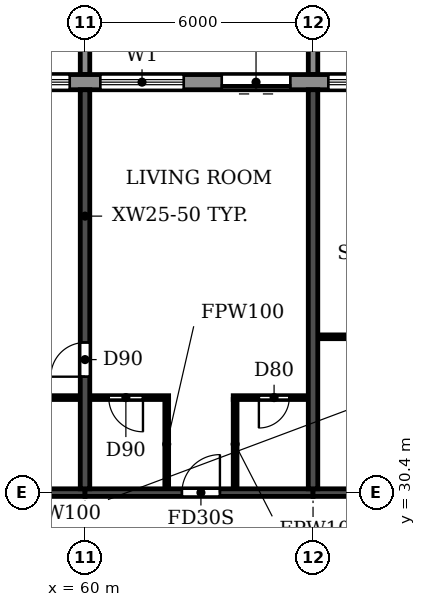
"""IFC4 building model, lengths in metres.
Left out: names, types, materials, properties, quantities, classifications, styles, units other than length and angle.
Written with IfcOpenShell. Run it as: python <this file> out.ifc"""

import sys

from ifc_helpers import new_model, si_unit, direction, frame, frame_2d, origin, place, context, subcontext, project, spatial, polyline, rectangle, outline, extrude, source, transform, mapped, element, fill, save


model = new_model("IFC4")
c1 = context("Model", 3, precision=1e-05, world=origin(), true_north=direction((0.0, 1.0)))
c2 = subcontext(c1, "Body", "Model", "MODEL_VIEW")
j1 = project(units=[si_unit("LENGTHUNIT", "METRE"), si_unit("PLANEANGLEUNIT", "RADIAN")], contexts=[c1])
p1 = place(None, origin())
s1 = spatial("IfcSite", under=j1, at=p1, CompositionType="ELEMENT")
p2 = place(p1, origin())
s2 = spatial("IfcBuilding", under=s1, at=p2, CompositionType="ELEMENT")
p3 = place(p2, frame((0.0, 0.0, 241.2)))
s3 = spatial("IfcBuildingStorey", under=s2, at=p3, CompositionType="ELEMENT", Elevation=241.2)
p4 = place(p3, frame((60.0, 30.5, 0.0), z_axis=(0.0, 0.0, 1.0), x_axis=(0.0, 1.0, 0.0)))
e1 = element("IfcWall", 1, at=p4, inside=s3, PredefinedType="SHEAR", context=c2, shape_type="SweptSolid", body=[
    extrude(rectangle(XDim=10.5, YDim=0.25, at=frame_2d((5.25, 0.0))), origin(), (0.0, 0.0, 1.0), 3.08),
])
p5 = place(p4, frame((2.95, 0.0, 0.0)))
e2 = element("IfcOpeningElement", 2, at=p5, cuts=e1, PredefinedType="OPENING", context=c2, shape_type="SweptSolid", body=[
    extrude(rectangle(XDim=0.9, YDim=2.1, at=frame_2d((0.45, 1.05))), frame((0.0, 0.135, 0.0), z_axis=(0.0, -1.0, 0.0), x_axis=(1.0, 0.0, 0.0)), (0.0, 0.0, 1.0), 0.27),
])
p6 = place(p3, frame((66.0, 30.5, 0.0), z_axis=(0.0, 0.0, 1.0), x_axis=(0.0, 1.0, 0.0)))
e3 = element("IfcWall", 3, at=p6, inside=s3, PredefinedType="SHEAR", context=c2, shape_type="SweptSolid", body=[
    extrude(rectangle(XDim=10.5, YDim=0.25, at=frame_2d((5.25, 0.0))), origin(), (0.0, 0.0, 1.0), 3.08),
])
p7 = place(p3, frame((54.0, 30.4, 0.0), z_axis=(0.0, 0.0, 1.0), x_axis=(1.0, 0.0, 0.0)))
e4 = element("IfcWall", 4, at=p7, inside=s3, PredefinedType="SHEAR", context=c2, shape_type="SweptSolid", body=[
    extrude(rectangle(XDim=6.0, YDim=0.2, at=frame_2d((3.0, 0.0))), origin(), (0.0, 0.0, 1.0), 2.48),
])
p8 = place(p3, frame((60.0, 30.4, 0.0), z_axis=(0.0, 0.0, 1.0), x_axis=(1.0, 0.0, 0.0)))
e5 = element("IfcWall", 5, at=p8, inside=s3, PredefinedType="SHEAR", context=c2, shape_type="SweptSolid", body=[
    extrude(rectangle(XDim=6.0, YDim=0.2, at=frame_2d((3.0, 0.0))), origin(), (0.0, 0.0, 1.0), 2.48),
])
p9 = place(p8, frame((2.55, 0.0, 0.0)))
e6 = element("IfcOpeningElement", 6, at=p9, cuts=e5, PredefinedType="OPENING", context=c2, shape_type="SweptSolid", body=[
    extrude(rectangle(XDim=1.0, YDim=2.1, at=frame_2d((0.5, 1.05))), frame((0.0, 0.11, 0.0), z_axis=(0.0, -1.0, 0.0), x_axis=(1.0, 0.0, 0.0)), (0.0, 0.0, 1.0), 0.22),
])
p10 = place(p3, frame((66.0, 30.4, 0.0), z_axis=(0.0, 0.0, 1.0), x_axis=(1.0, 0.0, 0.0)))
e7 = element("IfcWall", 7, at=p10, inside=s3, PredefinedType="SHEAR", context=c2, shape_type="SweptSolid", body=[
    extrude(rectangle(XDim=6.0, YDim=0.2, at=frame_2d((3.0, 0.0))), origin(), (0.0, 0.0, 1.0), 2.48),
])
p11 = place(p10, frame((2.45, 0.0, 0.0)))
e8 = element("IfcOpeningElement", 8, at=p11, cuts=e7, PredefinedType="OPENING", context=c2, shape_type="SweptSolid", body=[
    extrude(rectangle(XDim=1.0, YDim=2.1, at=frame_2d((0.5, 1.05))), frame((0.0, 0.11, 0.0), z_axis=(0.0, -1.0, 0.0), x_axis=(1.0, 0.0, 0.0)), (0.0, 0.0, 1.0), 0.22),
])
p12 = place(p3, frame((79.317, 41.2, 0.0), z_axis=(0.0, 0.0, 1.0), x_axis=(-1.0, 0.0, 0.0)))
e9 = element("IfcWall", 9, at=p12, inside=s3, PredefinedType="STANDARD", context=c2, shape_type="SweptSolid", body=[
    extrude(rectangle(XDim=56.634, YDim=0.4, at=frame_2d((28.317, 0.0))), origin(), (0.0, 0.0, 1.0), 3.08),
])
p13 = place(p12, frame((52.917, 0.0, 0.0)))
e10 = element("IfcOpeningElement", 10, at=p13, cuts=e9, PredefinedType="OPENING", context=c2, shape_type="SweptSolid", body=[
    extrude(rectangle(XDim=1.8, YDim=2.4, at=frame_2d((0.9, 1.2))), frame((0.0, 0.21, 0.0), z_axis=(0.0, -1.0, 0.0), x_axis=(1.0, 0.0, 0.0)), (0.0, 0.0, 1.0), 0.42),
])
p14 = place(p12, frame((49.717, 0.0, 0.9)))
e11 = element("IfcOpeningElement", 11, at=p14, cuts=e9, PredefinedType="OPENING", context=c2, shape_type="SweptSolid", body=[
    extrude(rectangle(XDim=2.2, YDim=1.5, at=frame_2d((1.1, 0.75))), frame((0.0, 0.21, 0.0), z_axis=(0.0, -1.0, 0.0), x_axis=(1.0, 0.0, 0.0)), (0.0, 0.0, 1.0), 0.42),
])
p15 = place(p12, frame((46.717, 0.0, 0.9)))
e12 = element("IfcOpeningElement", 12, at=p15, cuts=e9, PredefinedType="OPENING", context=c2, shape_type="SweptSolid", body=[
    extrude(rectangle(XDim=2.2, YDim=1.5, at=frame_2d((1.1, 0.75))), frame((0.0, 0.21, 0.0), z_axis=(0.0, -1.0, 0.0), x_axis=(1.0, 0.0, 0.0)), (0.0, 0.0, 1.0), 0.42),
])
p16 = place(p12, frame((43.717, 0.0, 0.9)))
e13 = element("IfcOpeningElement", 13, at=p16, cuts=e9, PredefinedType="OPENING", context=c2, shape_type="SweptSolid", body=[
    extrude(rectangle(XDim=2.2, YDim=1.5, at=frame_2d((1.1, 0.75))), frame((0.0, 0.21, 0.0), z_axis=(0.0, -1.0, 0.0), x_axis=(1.0, 0.0, 0.0)), (0.0, 0.0, 1.0), 0.42),
])
p17 = place(p12, frame((40.917, 0.0, 0.0)))
e14 = element("IfcOpeningElement", 14, at=p17, cuts=e9, PredefinedType="OPENING", context=c2, shape_type="SweptSolid", body=[
    extrude(rectangle(XDim=1.8, YDim=2.4, at=frame_2d((0.9, 1.2))), frame((0.0, 0.21, 0.0), z_axis=(0.0, -1.0, 0.0), x_axis=(1.0, 0.0, 0.0)), (0.0, 0.0, 1.0), 0.42),
])
p18 = place(p12, frame((37.717, 0.0, 0.9)))
e15 = element("IfcOpeningElement", 15, at=p18, cuts=e9, PredefinedType="OPENING", context=c2, shape_type="SweptSolid", body=[
    extrude(rectangle(XDim=2.2, YDim=1.5, at=frame_2d((1.1, 0.75))), frame((0.0, 0.21, 0.0), z_axis=(0.0, -1.0, 0.0), x_axis=(1.0, 0.0, 0.0)), (0.0, 0.0, 1.0), 0.42),
])
p19 = place(p12, frame((34.717, 0.0, 0.9)))
e16 = element("IfcOpeningElement", 16, at=p19, cuts=e9, PredefinedType="OPENING", context=c2, shape_type="SweptSolid", body=[
    extrude(rectangle(XDim=2.2, YDim=1.5, at=frame_2d((1.1, 0.75))), frame((0.0, 0.21, 0.0), z_axis=(0.0, -1.0, 0.0), x_axis=(1.0, 0.0, 0.0)), (0.0, 0.0, 1.0), 0.42),
])
p20 = place(p12, frame((31.717, 0.0, 0.9)))
e17 = element("IfcOpeningElement", 17, at=p20, cuts=e9, PredefinedType="OPENING", context=c2, shape_type="SweptSolid", body=[
    extrude(rectangle(XDim=2.2, YDim=1.5, at=frame_2d((1.1, 0.75))), frame((0.0, 0.21, 0.0), z_axis=(0.0, -1.0, 0.0), x_axis=(1.0, 0.0, 0.0)), (0.0, 0.0, 1.0), 0.42),
])
p21 = place(p12, frame((28.717, 0.0, 0.9)))
e18 = element("IfcOpeningElement", 18, at=p21, cuts=e9, PredefinedType="OPENING", context=c2, shape_type="SweptSolid", body=[
    extrude(rectangle(XDim=2.2, YDim=1.5, at=frame_2d((1.1, 0.75))), frame((0.0, 0.21, 0.0), z_axis=(0.0, -1.0, 0.0), x_axis=(1.0, 0.0, 0.0)), (0.0, 0.0, 1.0), 0.42),
])
p22 = place(p12, frame((25.917, 0.0, 0.0)))
e19 = element("IfcOpeningElement", 19, at=p22, cuts=e9, PredefinedType="OPENING", context=c2, shape_type="SweptSolid", body=[
    extrude(rectangle(XDim=1.8, YDim=2.4, at=frame_2d((0.9, 1.2))), frame((0.0, 0.21, 0.0), z_axis=(0.0, -1.0, 0.0), x_axis=(1.0, 0.0, 0.0)), (0.0, 0.0, 1.0), 0.42),
])
p23 = place(p12, frame((22.717, 0.0, 0.9)))
e20 = element("IfcOpeningElement", 20, at=p23, cuts=e9, PredefinedType="OPENING", context=c2, shape_type="SweptSolid", body=[
    extrude(rectangle(XDim=2.2, YDim=1.5, at=frame_2d((1.1, 0.75))), frame((0.0, 0.21, 0.0), z_axis=(0.0, -1.0, 0.0), x_axis=(1.0, 0.0, 0.0)), (0.0, 0.0, 1.0), 0.42),
])
p24 = place(p12, frame((19.717, 0.0, 0.9)))
e21 = element("IfcOpeningElement", 21, at=p24, cuts=e9, PredefinedType="OPENING", context=c2, shape_type="SweptSolid", body=[
    extrude(rectangle(XDim=2.2, YDim=1.5, at=frame_2d((1.1, 0.75))), frame((0.0, 0.21, 0.0), z_axis=(0.0, -1.0, 0.0), x_axis=(1.0, 0.0, 0.0)), (0.0, 0.0, 1.0), 0.42),
])
p25 = place(p12, frame((16.717, 0.0, 0.9)))
e22 = element("IfcOpeningElement", 22, at=p25, cuts=e9, PredefinedType="OPENING", context=c2, shape_type="SweptSolid", body=[
    extrude(rectangle(XDim=2.2, YDim=1.5, at=frame_2d((1.1, 0.75))), frame((0.0, 0.21, 0.0), z_axis=(0.0, -1.0, 0.0), x_axis=(1.0, 0.0, 0.0)), (0.0, 0.0, 1.0), 0.42),
])
p26 = place(p12, frame((13.917, 0.0, 0.0)))
e23 = element("IfcOpeningElement", 23, at=p26, cuts=e9, PredefinedType="OPENING", context=c2, shape_type="SweptSolid", body=[
    extrude(rectangle(XDim=1.8, YDim=2.4, at=frame_2d((0.9, 1.2))), frame((0.0, 0.21, 0.0), z_axis=(0.0, -1.0, 0.0), x_axis=(1.0, 0.0, 0.0)), (0.0, 0.0, 1.0), 0.42),
])
p27 = place(p12, frame((10.717, 0.0, 0.9)))
e24 = element("IfcOpeningElement", 24, at=p27, cuts=e9, PredefinedType="OPENING", context=c2, shape_type="SweptSolid", body=[
    extrude(rectangle(XDim=2.2, YDim=1.5, at=frame_2d((1.1, 0.75))), frame((0.0, 0.21, 0.0), z_axis=(0.0, -1.0, 0.0), x_axis=(1.0, 0.0, 0.0)), (0.0, 0.0, 1.0), 0.42),
])
p28 = place(p12, frame((7.917, 0.0, 0.0)))
e25 = element("IfcOpeningElement", 25, at=p28, cuts=e9, PredefinedType="OPENING", context=c2, shape_type="SweptSolid", body=[
    extrude(rectangle(XDim=1.8, YDim=2.4, at=frame_2d((0.9, 1.2))), frame((0.0, 0.21, 0.0), z_axis=(0.0, -1.0, 0.0), x_axis=(1.0, 0.0, 0.0)), (0.0, 0.0, 1.0), 0.42),
])
p29 = place(p12, frame((4.717, 0.0, 0.9)))
e26 = element("IfcOpeningElement", 26, at=p29, cuts=e9, PredefinedType="OPENING", context=c2, shape_type="SweptSolid", body=[
    extrude(rectangle(XDim=2.2, YDim=1.5, at=frame_2d((1.1, 0.75))), frame((0.0, 0.21, 0.0), z_axis=(0.0, -1.0, 0.0), x_axis=(1.0, 0.0, 0.0)), (0.0, 0.0, 1.0), 0.42),
])
p30 = place(p12, frame((1.917, 0.0, 0.0)))
e27 = element("IfcOpeningElement", 27, at=p30, cuts=e9, PredefinedType="OPENING", context=c2, shape_type="SweptSolid", body=[
    extrude(rectangle(XDim=1.8, YDim=2.4, at=frame_2d((0.9, 1.2))), frame((0.0, 0.21, 0.0), z_axis=(0.0, -1.0, 0.0), x_axis=(1.0, 0.0, 0.0)), (0.0, 0.0, 1.0), 0.42),
])
m1 = source(origin(), c2, "Body", "SweptSolid", [
    extrude(outline(polyline([(0.0, 0.0), (0.25, 0.0), (0.25, 3.1), (0.0, 3.1), (0.0, 0.0)])), origin(), (0.0, 0.0, 1.0), 3.1),
])
for number, where in (
    (28, (59.875, 41.4, 0.0)),
    (29, (65.875, 41.4, 0.0)),
):
    element("IfcWall", number, at=place(p3, frame(where)), inside=s3, PredefinedType="STANDARD", context=c2, shape_type="MappedRepresentation", body=[
        mapped(m1, transform((0.0, 0.0, 0.0))),
    ])
p31 = place(p3, frame((57.1, 32.9, 0.0), z_axis=(0.0, 0.0, 1.0), x_axis=(1.0, 0.0, 0.0)))
e30 = element("IfcWall", 30, at=p31, inside=s3, PredefinedType="PARTITIONING", context=c2, shape_type="SweptSolid", body=[
    extrude(rectangle(XDim=2.765, YDim=0.1, at=frame_2d((1.382, 0.0))), origin(), (0.0, 0.0, 1.0), 3.08),
])
p32 = place(p31, frame((1.0, 0.0, 0.0)))
e31 = element("IfcOpeningElement", 31, at=p32, cuts=e30, PredefinedType="OPENING", context=c2, shape_type="SweptSolid", body=[
    extrude(rectangle(XDim=0.8, YDim=2.1, at=frame_2d((0.4, 1.05))), frame((0.0, 0.06, 0.0), z_axis=(0.0, -1.0, 0.0), x_axis=(1.0, 0.0, 0.0)), (0.0, 0.0, 1.0), 0.12),
])
p33 = place(p3, frame((60.135, 32.9, 0.0), z_axis=(0.0, 0.0, 1.0), x_axis=(1.0, 0.0, 0.0)))
e32 = element("IfcWall", 32, at=p33, inside=s3, PredefinedType="PARTITIONING", context=c2, shape_type="SweptSolid", body=[
    extrude(rectangle(XDim=2.065, YDim=0.1, at=frame_2d((1.032, 0.0))), origin(), (0.0, 0.0, 1.0), 3.08),
])
p34 = place(p33, frame((0.49, 0.0, 0.0)))
e33 = element("IfcOpeningElement", 33, at=p34, cuts=e32, PredefinedType="OPENING", context=c2, shape_type="SweptSolid", body=[
    extrude(rectangle(XDim=0.9, YDim=2.1, at=frame_2d((0.45, 1.05))), frame((0.0, 0.06, 0.0), z_axis=(0.0, -1.0, 0.0), x_axis=(1.0, 0.0, 0.0)), (0.0, 0.0, 1.0), 0.12),
])
p35 = place(p3, frame((63.9, 32.9, 0.0), z_axis=(0.0, 0.0, 1.0), x_axis=(1.0, 0.0, 0.0)))
e34 = element("IfcWall", 34, at=p35, inside=s3, PredefinedType="PARTITIONING", context=c2, shape_type="SweptSolid", body=[
    extrude(rectangle(XDim=1.965, YDim=0.1, at=frame_2d((0.982, 0.0))), origin(), (0.0, 0.0, 1.0), 3.08),
])
p36 = place(p35, frame((0.675, 0.0, 0.0)))
e35 = element("IfcOpeningElement", 35, at=p36, cuts=e34, PredefinedType="OPENING", context=c2, shape_type="SweptSolid", body=[
    extrude(rectangle(XDim=0.8, YDim=2.1, at=frame_2d((0.4, 1.05))), frame((0.0, 0.06, 0.0), z_axis=(0.0, -1.0, 0.0), x_axis=(1.0, 0.0, 0.0)), (0.0, 0.0, 1.0), 0.12),
])
p37 = place(p3, frame((66.135, 34.5, 0.0), z_axis=(0.0, 0.0, 1.0), x_axis=(1.0, 0.0, 0.0)))
e36 = element("IfcWall", 36, at=p37, inside=s3, PredefinedType="PARTITIONING", context=c2, shape_type="SweptSolid", body=[
    extrude(rectangle(XDim=1.965, YDim=0.1, at=frame_2d((0.982, 0.0))), origin(), (0.0, 0.0, 1.0), 3.08),
])
for number, where, z_axis, x_axis in (
    (37, (62.15, 30.51, 0.0), (0.0, 0.0, 1.0), (0.0, 1.0, 0.0)),
    (38, (63.95, 30.51, 0.0), (0.0, 0.0, 1.0), (0.0, 1.0, 0.0)),
):
    element("IfcWall", number, at=place(p3, frame(where, z_axis=z_axis, x_axis=x_axis)), inside=s3, PredefinedType="PARTITIONING", context=c2, shape_type="SweptSolid", body=[
        extrude(rectangle(XDim=2.34, YDim=0.1, at=frame_2d((1.17, 0.0))), origin(), (0.0, 0.0, 1.0), 3.08),
    ])
p38 = place(p24, origin())
e39 = element("IfcWindow", 39, at=p38, inside=s3, PartitioningType="DOUBLE_PANEL_HORIZONTAL", PredefinedType="WINDOW", context=c2, shape_type="SweptSolid", body=[
    extrude(rectangle(XDim=2.2, YDim=1.5, at=frame_2d((1.1, 0.75))), frame((0.0, 0.03, 0.0), z_axis=(0.0, -1.0, 0.0), x_axis=(1.0, 0.0, 0.0)), (0.0, 0.0, 1.0), 0.06),
])
fill(e21, e39)
p39 = place(p25, origin())
e40 = element("IfcWindow", 40, at=p39, inside=s3, PartitioningType="DOUBLE_PANEL_HORIZONTAL", PredefinedType="WINDOW", context=c2, shape_type="SweptSolid", body=[
    extrude(rectangle(XDim=2.2, YDim=1.5, at=frame_2d((1.1, 0.75))), frame((0.0, 0.03, 0.0), z_axis=(0.0, -1.0, 0.0), x_axis=(1.0, 0.0, 0.0)), (0.0, 0.0, 1.0), 0.06),
])
fill(e22, e40)
p40 = place(p26, origin())
e41 = element("IfcDoor", 41, at=p40, inside=s3, OperationType="DOUBLE_DOOR_SLIDING", PredefinedType="DOOR", context=c2, shape_type="SweptSolid", body=[
    extrude(rectangle(XDim=1.8, YDim=2.4, at=frame_2d((0.9, 1.2))), frame((0.0, 0.025, 0.0), z_axis=(0.0, -1.0, 0.0), x_axis=(1.0, 0.0, 0.0)), (0.0, 0.0, 1.0), 0.05),
])
fill(e23, e41)
p41 = place(p27, origin())
e42 = element("IfcWindow", 42, at=p41, inside=s3, PartitioningType="DOUBLE_PANEL_HORIZONTAL", PredefinedType="WINDOW", context=c2, shape_type="SweptSolid", body=[
    extrude(rectangle(XDim=2.2, YDim=1.5, at=frame_2d((1.1, 0.75))), frame((0.0, 0.03, 0.0), z_axis=(0.0, -1.0, 0.0), x_axis=(1.0, 0.0, 0.0)), (0.0, 0.0, 1.0), 0.06),
])
fill(e24, e42)
p42 = place(p5, origin())
e43 = element("IfcDoor", 43, at=p42, inside=s3, OperationType="SINGLE_SWING_LEFT", PredefinedType="DOOR", context=c2, shape_type="SweptSolid", body=[
    extrude(rectangle(XDim=0.9, YDim=2.1, at=frame_2d((0.45, 1.05))), frame((0.0, 0.025, 0.0), z_axis=(0.0, -1.0, 0.0), x_axis=(1.0, 0.0, 0.0)), (0.0, 0.0, 1.0), 0.05),
])
fill(e2, e43)
p43 = place(p34, frame((0.9, 0.0, 0.0), z_axis=(0.0, 0.0, 1.0), x_axis=(-1.0, 0.0, 0.0)))
e44 = element("IfcDoor", 44, at=p43, inside=s3, OperationType="SINGLE_SWING_LEFT", PredefinedType="DOOR", context=c2, shape_type="SweptSolid", body=[
    extrude(rectangle(XDim=0.9, YDim=2.1, at=frame_2d((0.45, 1.05))), frame((0.0, 0.025, 0.0), z_axis=(0.0, -1.0, 0.0), x_axis=(1.0, 0.0, 0.0)), (0.0, 0.0, 1.0), 0.05),
])
fill(e33, e44)
p44 = place(p9, origin())
e45 = element("IfcDoor", 45, at=p44, inside=s3, OperationType="SINGLE_SWING_RIGHT", PredefinedType="DOOR", context=c2, shape_type="SweptSolid", body=[
    extrude(rectangle(XDim=1.0, YDim=2.1, at=frame_2d((0.5, 1.05))), frame((0.0, 0.025, 0.0), z_axis=(0.0, -1.0, 0.0), x_axis=(1.0, 0.0, 0.0)), (0.0, 0.0, 1.0), 0.05),
])
fill(e6, e45)
p45 = place(p36, frame((0.8, 0.0, 0.0), z_axis=(0.0, 0.0, 1.0), x_axis=(-1.0, 0.0, 0.0)))
e46 = element("IfcDoor", 46, at=p45, inside=s3, OperationType="SINGLE_SWING_RIGHT", PredefinedType="DOOR", context=c2, shape_type="SweptSolid", body=[
    extrude(rectangle(XDim=0.8, YDim=2.1, at=frame_2d((0.4, 1.05))), frame((0.0, 0.025, 0.0), z_axis=(0.0, -1.0, 0.0), x_axis=(1.0, 0.0, 0.0)), (0.0, 0.0, 1.0), 0.05),
])
fill(e35, e46)
save(model, sys.argv[1])
